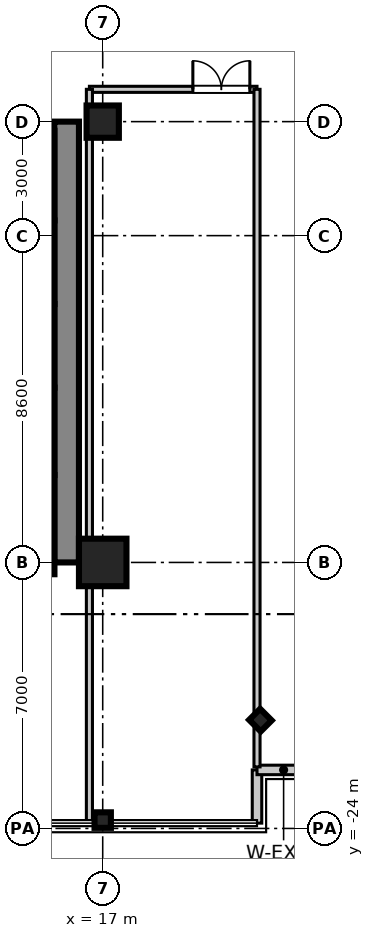
"""IFC4 building model, lengths in metres.
Left out: names, types, materials, properties, quantities, classifications, styles, units other than length and angle.
Written with IfcOpenShell. Run it as: python <this file> out.ifc"""

import sys

from ifc_helpers import new_model, si_unit, direction, frame, frame_2d, origin, origin_2d, place, context, subcontext, project, spatial, rectangle, i_section, extrude, source, transform, mapped, element, fill, save


model = new_model("IFC4")
c1 = context("Model", 3, precision=1e-05, world=origin(), true_north=direction((0.0, 1.0)))
c2 = subcontext(c1, "Body", "Model", "MODEL_VIEW")
j1 = project(units=[si_unit("LENGTHUNIT", "METRE"), si_unit("PLANEANGLEUNIT", "RADIAN")], contexts=[c1])
p1 = place(None, origin())
s1 = spatial("IfcSite", under=j1, at=p1, CompositionType="ELEMENT")
p2 = place(p1, origin())
s2 = spatial("IfcBuilding", under=s1, at=p2, CompositionType="ELEMENT")
p3 = place(p2, frame((0.0, 0.0, 124.8)))
s3 = spatial("IfcBuildingStorey", under=s2, at=p3, CompositionType="ELEMENT", Elevation=124.8)
m1 = source(origin(), c2, "Body", "SweptSolid", [
    extrude(rectangle(XDim=1.25, YDim=1.25, at=origin_2d()), origin(), (0.0, 0.0, 1.0), 3.605),
])
p4 = place(p3, frame((17.0, -17.0, 0.0), z_axis=(0.0, 0.0, 1.0), x_axis=(1.0, 0.0, 0.0)))
e1 = element("IfcColumn", 1, at=p4, inside=s3, PredefinedType="COLUMN", context=c2, shape_type="MappedRepresentation", body=[
    mapped(m1, transform((0.0, 0.0, 0.0), scale=1.0)),
])
m2 = source(origin(), c2, "Body", "SweptSolid", [
    extrude(rectangle(XDim=0.85, YDim=0.85, at=origin_2d()), origin(), (0.0, 0.0, 1.0), 3.605),
])
p5 = place(p3, frame((17.0, -5.4, 0.0), z_axis=(0.0, 0.0, 1.0), x_axis=(1.0, 0.0, 0.0)))
e2 = element("IfcColumn", 2, at=p5, inside=s3, PredefinedType="PILASTER", context=c2, shape_type="MappedRepresentation", body=[
    mapped(m2, transform((0.0, 0.0, 0.0), scale=1.0)),
])
m3 = source(origin(), c2, "Body", "SweptSolid", [
    extrude(i_section(OverallWidth=0.409, OverallDepth=0.43, WebThickness=0.021, FlangeThickness=0.034, at=origin_2d()), origin(), (0.0, 0.0, 1.0), 3.605),
])
for number, where, z_axis, x_axis in (
    (3, (17.0, -23.78, 0.0), (0.0, 0.0, 1.0), (0.0, 1.0, 0.0)),
    (4, (21.15, -21.15, 0.0), (0.0, 0.0, 1.0), (0.707, 0.707, 0.0)),
):
    element("IfcColumn", number, at=place(p3, frame(where, z_axis=z_axis, x_axis=x_axis)), inside=s3, PredefinedType="COLUMN", context=c2, shape_type="MappedRepresentation", body=[
        mapped(m3, transform((0.0, 0.0, 0.0), scale=1.0)),
    ])
m4 = source(origin(), c2, "Body", "SweptSolid", [
    extrude(rectangle(XDim=11.6, YDim=0.65, at=frame_2d((5.8, 0.0))), origin(), (0.0, 0.0, 1.0), 3.38),
])
p6 = place(p3, frame((16.05, -17.0, 0.0), z_axis=(0.0, 0.0, 1.0), x_axis=(0.0, 1.0, 0.0)))
e5 = element("IfcWall", 5, at=p6, inside=s3, PredefinedType="SHEAR", context=c2, shape_type="MappedRepresentation", body=[
    mapped(m4, transform((0.0, 0.0, 0.0), scale=1.0)),
])
m5 = source(origin(), c2, "Body", "SweptSolid", [
    extrude(rectangle(XDim=2.36, YDim=0.22, at=frame_2d((1.18, 0.0))), origin(), (0.0, 0.0, 1.0), 3.38),
])
p7 = place(p3, frame((15.62, -8.0, 0.0), z_axis=(0.0, 0.0, 1.0), x_axis=(0.0, 1.0, 0.0)))
e6 = element("IfcWall", 6, at=p7, inside=s3, PredefinedType="SHEAR", context=c2, shape_type="MappedRepresentation", body=[
    mapped(m5, transform((0.0, 0.0, 0.0), scale=1.0)),
])
m6 = source(origin(), c2, "Body", "SweptSolid", [
    extrude(rectangle(XDim=2.2, YDim=0.22, at=frame_2d((1.1, 0.0))), origin(), (0.0, 0.0, 1.0), 3.38),
])
for number, where, z_axis, x_axis in (
    (7, (15.62, -10.2, 0.0), (0.0, 0.0, 1.0), (0.0, 1.0, 0.0)),
    (8, (15.62, -12.4, 0.0), (0.0, 0.0, 1.0), (0.0, 1.0, 0.0)),
):
    element("IfcWall", number, at=place(p3, frame(where, z_axis=z_axis, x_axis=x_axis)), inside=s3, PredefinedType="SHEAR", context=c2, shape_type="MappedRepresentation", body=[
        mapped(m6, transform((0.0, 0.0, 0.0), scale=1.0)),
    ])
m7 = source(origin(), c2, "Body", "SweptSolid", [
    extrude(rectangle(XDim=2.3, YDim=0.22, at=frame_2d((1.15, 0.0))), origin(), (0.0, 0.0, 1.0), 3.38),
])
p8 = place(p3, frame((15.62, -14.7, 0.0), z_axis=(0.0, 0.0, 1.0), x_axis=(0.0, 1.0, 0.0)))
e9 = element("IfcWall", 9, at=p8, inside=s3, PredefinedType="SHEAR", context=c2, shape_type="MappedRepresentation", body=[
    mapped(m7, transform((0.0, 0.0, 0.0), scale=1.0)),
])
m8 = source(origin(), c2, "Body", "SweptSolid", [
    extrude(rectangle(XDim=2.61, YDim=0.22, at=frame_2d((1.305, 0.0))), origin(), (0.0, 0.0, 1.0), 3.38),
])
p9 = place(p3, frame((15.62, -17.31, 0.0), z_axis=(0.0, 0.0, 1.0), x_axis=(0.0, 1.0, 0.0)))
e10 = element("IfcWall", 10, at=p9, inside=s3, PredefinedType="SHEAR", context=c2, shape_type="MappedRepresentation", body=[
    mapped(m8, transform((0.0, 0.0, 0.0), scale=1.0)),
])
m9 = source(origin(), c2, "Body", "SweptSolid", [
    extrude(rectangle(XDim=1.4, YDim=0.25, at=frame_2d((0.7, 0.0))), origin(), (0.0, 0.0, 1.0), 3.38),
])
p10 = place(p3, frame((21.06, -23.86, 0.0), z_axis=(0.0, 0.0, 1.0), x_axis=(0.0, 1.0, 0.0)))
e11 = element("IfcWall", 11, at=p10, inside=s3, PredefinedType="STANDARD", context=c2, shape_type="MappedRepresentation", body=[
    mapped(m9, transform((0.0, 0.0, 0.0), scale=1.0)),
])
m10 = source(origin(), c2, "Body", "SweptSolid", [
    extrude(rectangle(XDim=1.4, YDim=0.25, at=frame_2d((0.7, 0.0))), origin(), (0.0, 0.0, 1.0), 3.38),
])
p11 = place(p3, frame((21.06, -22.46, 0.0), z_axis=(0.0, 0.0, 1.0), x_axis=(1.0, 0.0, 0.0)))
e12 = element("IfcWall", 12, at=p11, inside=s3, PredefinedType="STANDARD", context=c2, shape_type="MappedRepresentation", body=[
    mapped(m10, transform((0.0, 0.0, 0.0), scale=1.0)),
])
m11 = source(origin(), c2, "Body", "SweptSolid", [
    extrude(rectangle(XDim=4.41, YDim=0.16, at=frame_2d((2.205, 0.0))), origin(), (0.0, 0.0, 1.0), 2.72),
])
p12 = place(p3, frame((16.65, -4.55, 0.0), z_axis=(0.0, 0.0, 1.0), x_axis=(1.0, 0.0, 0.0)))
e13 = element("IfcWall", 13, at=p12, inside=s3, PredefinedType="PARTITIONING", context=c2, shape_type="MappedRepresentation", body=[
    mapped(m11, transform((0.0, 0.0, 0.0), scale=1.0)),
])
p13 = place(p12, frame((2.722, 0.0, 0.0)))
e14 = element("IfcOpeningElement", 14, at=p13, cuts=e13, PredefinedType="OPENING", context=c2, shape_type="SweptSolid", body=[
    extrude(rectangle(XDim=1.5, YDim=2.15, at=frame_2d((0.75, 1.075))), frame((0.0, 0.09, 0.0), z_axis=(0.0, -1.0, 0.0), x_axis=(1.0, 0.0, 0.0)), (0.0, 0.0, 1.0), 0.18),
])
m12 = source(origin(), c2, "Body", "SweptSolid", [
    extrude(rectangle(XDim=19.25, YDim=0.16, at=frame_2d((9.625, 0.0))), origin(), (0.0, 0.0, 1.0), 2.72),
])
p14 = place(p3, frame((16.65, -23.8, 0.0), z_axis=(0.0, 0.0, 1.0), x_axis=(0.0, 1.0, 0.0)))
e15 = element("IfcWall", 15, at=p14, inside=s3, PredefinedType="PARTITIONING", context=c2, shape_type="MappedRepresentation", body=[
    mapped(m12, transform((0.0, 0.0, 0.0), scale=1.0)),
])
m13 = source(origin(), c2, "Body", "SweptSolid", [
    extrude(rectangle(XDim=17.83, YDim=0.16, at=frame_2d((8.915, 0.0))), origin(), (0.0, 0.0, 1.0), 2.72),
])
p15 = place(p3, frame((21.06, -22.38, 0.0), z_axis=(0.0, 0.0, 1.0), x_axis=(0.0, 1.0, 0.0)))
e16 = element("IfcWall", 16, at=p15, inside=s3, PredefinedType="PARTITIONING", context=c2, shape_type="MappedRepresentation", body=[
    mapped(m13, transform((0.0, 0.0, 0.0), scale=1.0)),
])
m14 = source(origin(), c2, "Body", "SweptSolid", [
    extrude(rectangle(XDim=1.5, YDim=2.15, at=frame_2d((0.75, 1.075))), frame((0.0, 0.025, 0.0), z_axis=(0.0, -1.0, 0.0), x_axis=(1.0, 0.0, 0.0)), (0.0, 0.0, 1.0), 0.05),
])
p16 = place(p13, frame((1.5, 0.0, 0.0), z_axis=(0.0, 0.0, 1.0), x_axis=(-1.0, 0.0, 0.0)))
e17 = element("IfcDoor", 17, at=p16, inside=s3, OperationType="DOUBLE_DOOR_SINGLE_SWING", PredefinedType="DOOR", context=c2, shape_type="MappedRepresentation", body=[
    mapped(m14, transform((0.0, 0.0, 0.0), scale=1.0)),
])
fill(e14, e17)
save(model, sys.argv[1])
